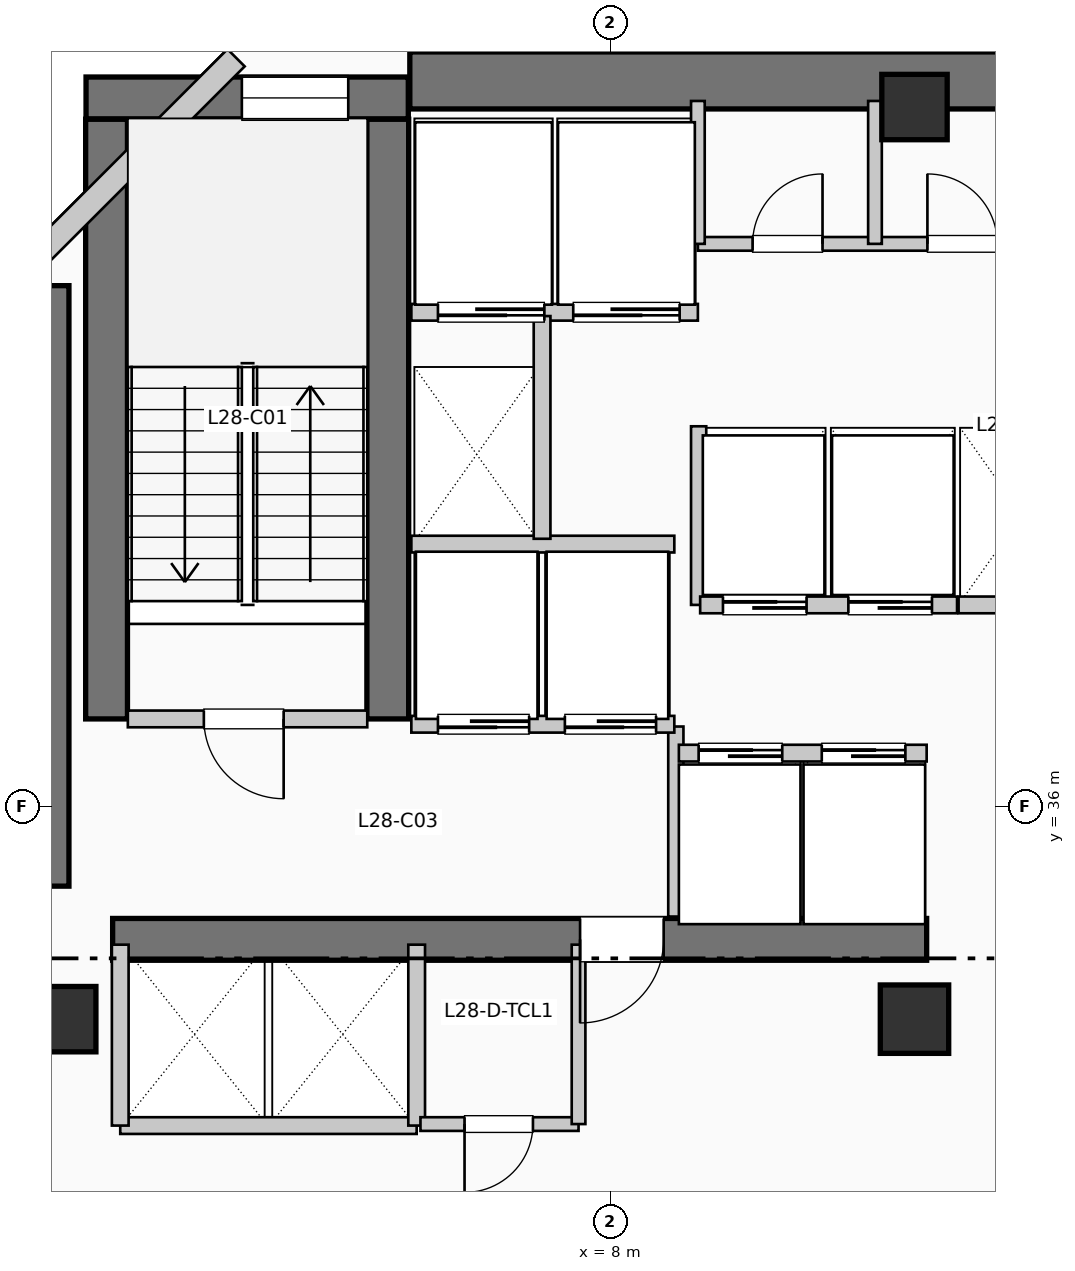
"""IFC4 building model, lengths in metres.
Left out: names, types, materials, properties, quantities, classifications, styles, units other than length and angle.
Written with IfcOpenShell. Run it as: python <this file> out.ifc"""

import sys

from ifc_helpers import new_model, si_unit, direction, frame, frame_2d, origin, origin_2d, place, context, subcontext, project, spatial, rectangle, extrude, element, fill, save


model = new_model("IFC4")
c1 = context("Model", 3, precision=1e-05, world=origin(), true_north=direction((0.0, 1.0)))
c2 = subcontext(c1, "Body", "Model", "MODEL_VIEW")
j1 = project(units=[si_unit("LENGTHUNIT", "METRE"), si_unit("PLANEANGLEUNIT", "RADIAN")], contexts=[c1])
p1 = place(None, origin())
s1 = spatial("IfcSite", under=j1, at=p1, CompositionType="ELEMENT")
p2 = place(p1, origin())
s2 = spatial("IfcBuilding", under=s1, at=p2, CompositionType="ELEMENT")
p3 = place(p2, frame((0.0, 0.0, 118.47)))
s3 = spatial("IfcBuildingStorey", under=s2, at=p3, CompositionType="ELEMENT", Elevation=118.47)
p4 = place(p3, frame((5.36, 45.55, 0.0), z_axis=(0.0, 0.0, 1.0), x_axis=(1.0, 0.0, 0.0)))
e1 = element("IfcWall", 1, at=p4, inside=s3, PredefinedType="SHEAR", context=c2, shape_type="SweptSolid", body=[
    extrude(rectangle(XDim=13.98, YDim=0.75, at=frame_2d((6.99, 0.0))), origin(), (0.0, 0.0, 1.0), 3.96),
])
p5 = place(p3, frame((0.5, 34.95, 0.0), z_axis=(0.0, 0.0, 1.0), x_axis=(0.0, 1.0, 0.0)))
e2 = element("IfcWall", 2, at=p5, inside=s3, PredefinedType="SHEAR", context=c2, shape_type="SweptSolid", body=[
    extrude(rectangle(XDim=7.9, YDim=0.75, at=frame_2d((3.95, 0.0))), origin(), (0.0, 0.0, 1.0), 3.96),
])
p6 = place(p3, frame((1.45, 34.25, 0.0), z_axis=(0.0, 0.0, 1.0), x_axis=(1.0, 0.0, 0.0)))
e3 = element("IfcWall", 3, at=p6, inside=s3, PredefinedType="SHEAR", context=c2, shape_type="SweptSolid", body=[
    extrude(rectangle(XDim=10.71, YDim=0.55, at=frame_2d((5.355, 0.0))), origin(), (0.0, 0.0, 1.0), 3.96),
])
p7 = place(p6, frame((7.25, 0.0, 0.0), z_axis=(0.0, 0.0, 1.0), x_axis=(-1.0, 0.0, 0.0)))
e4 = element("IfcOpeningElement", 4, at=p7, cuts=e3, PredefinedType="OPENING", context=c2, shape_type="SweptSolid", body=[
    extrude(rectangle(XDim=1.1, YDim=2.15, at=frame_2d((0.55, 1.075))), frame((0.0, 0.285, 0.0), z_axis=(0.0, -1.0, 0.0), x_axis=(1.0, 0.0, 0.0)), (0.0, 0.0, 1.0), 0.57),
])
for number, where, z_axis, x_axis in (
    (5, (1.37, 37.15, 0.0), (0.0, 0.0, 1.0), (0.0, 1.0, 0.0)),
    (6, (5.07, 37.15, 0.0), (0.0, 0.0, 1.0), (0.0, 1.0, 0.0)),
):
    element("IfcWall", number, at=place(p3, frame(where, z_axis=z_axis, x_axis=x_axis)), inside=s3, PredefinedType="SHEAR", context=c2, shape_type="SweptSolid", body=[
        extrude(rectangle(XDim=7.89, YDim=0.55, at=frame_2d((3.945, 0.0))), origin(), (0.0, 0.0, 1.0), 3.96),
    ])
p8 = place(p3, frame((1.1, 45.32, 0.0), z_axis=(0.0, 0.0, 1.0), x_axis=(1.0, 0.0, 0.0)))
e7 = element("IfcWall", 7, at=p8, inside=s3, PredefinedType="SHEAR", context=c2, shape_type="SweptSolid", body=[
    extrude(rectangle(XDim=4.24, YDim=0.55, at=frame_2d((2.12, 0.0))), origin(), (0.0, 0.0, 1.0), 3.96),
])
p9 = place(p8, frame((2.05, 0.0, 1.05)))
e8 = element("IfcOpeningElement", 8, at=p9, cuts=e7, PredefinedType="OPENING", context=c2, shape_type="SweptSolid", body=[
    extrude(rectangle(XDim=1.4, YDim=1.8, at=frame_2d((0.7, 0.9))), frame((0.0, 0.285, 0.0), z_axis=(0.0, -1.0, 0.0), x_axis=(1.0, 0.0, 0.0)), (0.0, 0.0, 1.0), 0.57),
])
p10 = place(p3, frame((0.8, 33.2, 0.0), z_axis=(0.0, 0.0, 1.0), x_axis=(1.0, 0.0, 0.0)))
e9 = element("IfcColumn", 9, at=p10, inside=s3, PredefinedType="COLUMN", context=c2, shape_type="SweptSolid", body=[
    extrude(rectangle(XDim=0.86, YDim=0.86, at=origin_2d()), origin(), (0.0, 0.0, 1.0), 3.96),
])
p11 = place(p3, frame((12.0, 33.2, 0.0), z_axis=(0.0, 0.0, 1.0), x_axis=(1.0, 0.0, 0.0)))
e10 = element("IfcColumn", 10, at=p11, inside=s3, PredefinedType="COLUMN", context=c2, shape_type="SweptSolid", body=[
    extrude(rectangle(XDim=0.9, YDim=0.9, at=origin_2d()), origin(), (0.0, 0.0, 1.0), 3.96),
])
p12 = place(p3, frame((12.0, 45.2, 0.0), z_axis=(0.0, 0.0, 1.0), x_axis=(1.0, 0.0, 0.0)))
e11 = element("IfcColumn", 11, at=p12, inside=s3, PredefinedType="COLUMN", context=c2, shape_type="SweptSolid", body=[
    extrude(rectangle(XDim=0.86, YDim=0.86, at=origin_2d()), origin(), (0.0, 0.0, 1.0), 3.96),
])
p13 = place(p3, frame((3.074, 45.848, 0.0), z_axis=(0.0, 0.0, 1.0), x_axis=(-0.707106781187, -0.707106781187, 0.0)))
e12 = element("IfcWall", 12, at=p13, inside=s3, PredefinedType="SOLIDWALL", context=c2, shape_type="SweptSolid", body=[
    extrude(rectangle(XDim=4.133, YDim=0.32, at=frame_2d((2.066, 0.0))), origin(), (0.0, 0.0, 1.0), 3.71),
])
p14 = place(p3, frame((1.65, 37.15, 0.0), z_axis=(0.0, 0.0, 1.0), x_axis=(1.0, 0.0, 0.0)))
e13 = element("IfcWall", 13, at=p14, inside=s3, PredefinedType="PARTITIONING", context=c2, shape_type="SweptSolid", body=[
    extrude(rectangle(XDim=3.15, YDim=0.22, at=frame_2d((1.575, 0.0))), origin(), (0.0, 0.0, 1.0), 3.71),
])
p15 = place(p14, frame((2.05, 0.0, 0.0), z_axis=(0.0, 0.0, 1.0), x_axis=(-1.0, 0.0, 0.0)))
e14 = element("IfcOpeningElement", 14, at=p15, cuts=e13, PredefinedType="OPENING", context=c2, shape_type="SweptSolid", body=[
    extrude(rectangle(XDim=1.05, YDim=2.15, at=frame_2d((0.525, 1.075))), frame((0.0, 0.12, 0.0), z_axis=(0.0, -1.0, 0.0), x_axis=(1.0, 0.0, 0.0)), (0.0, 0.0, 1.0), 0.24),
])
p16 = place(p3, frame((8.86, 34.55, 0.0), z_axis=(0.0, 0.0, 1.0), x_axis=(0.0, 1.0, 0.0)))
e15 = element("IfcWall", 15, at=p16, inside=s3, PredefinedType="PARTITIONING", context=c2, shape_type="SweptSolid", body=[
    extrude(rectangle(XDim=2.5, YDim=0.2, at=frame_2d((1.25, 0.0))), origin(), (0.0, 0.0, 1.0), 3.71),
])
p17 = place(p3, frame((5.38, 37.08, 0.0), z_axis=(0.0, 0.0, 1.0), x_axis=(1.0, 0.0, 0.0)))
e16 = element("IfcWall", 16, at=p17, inside=s3, PredefinedType="PARTITIONING", context=c2, shape_type="SweptSolid", body=[
    extrude(rectangle(XDim=3.46, YDim=0.22, at=frame_2d((1.73, 0.0))), origin(), (0.0, 0.0, 1.0), 3.71),
])
p18 = place(p17, frame((1.55, 0.0, 0.0), z_axis=(0.0, 0.0, 1.0), x_axis=(-1.0, 0.0, 0.0)))
e17 = element("IfcOpeningElement", 17, at=p18, cuts=e16, PredefinedType="OPENING", context=c2, shape_type="SweptSolid", body=[
    extrude(rectangle(XDim=1.2, YDim=2.2, at=frame_2d((0.6, 1.1))), frame((0.0, 0.12, 0.0), z_axis=(0.0, -1.0, 0.0), x_axis=(1.0, 0.0, 0.0)), (0.0, 0.0, 1.0), 0.24),
])
p19 = place(p17, frame((3.22, 0.0, 0.0), z_axis=(0.0, 0.0, 1.0), x_axis=(-1.0, 0.0, 0.0)))
e18 = element("IfcOpeningElement", 18, at=p19, cuts=e16, PredefinedType="OPENING", context=c2, shape_type="SweptSolid", body=[
    extrude(rectangle(XDim=1.2, YDim=2.2, at=frame_2d((0.6, 1.1))), frame((0.0, 0.12, 0.0), z_axis=(0.0, -1.0, 0.0), x_axis=(1.0, 0.0, 0.0)), (0.0, 0.0, 1.0), 0.24),
])
p20 = place(p3, frame((5.38, 39.45, 0.0), z_axis=(0.0, 0.0, 1.0), x_axis=(1.0, 0.0, 0.0)))
e19 = element("IfcWall", 19, at=p20, inside=s3, PredefinedType="PARTITIONING", context=c2, shape_type="SweptSolid", body=[
    extrude(rectangle(XDim=3.46, YDim=0.22, at=frame_2d((1.73, 0.0))), origin(), (0.0, 0.0, 1.0), 3.71),
])
p21 = place(p3, frame((5.38, 42.5, 0.0), z_axis=(0.0, 0.0, 1.0), x_axis=(1.0, 0.0, 0.0)))
e20 = element("IfcWall", 20, at=p21, inside=s3, PredefinedType="PARTITIONING", context=c2, shape_type="SweptSolid", body=[
    extrude(rectangle(XDim=3.77, YDim=0.22, at=frame_2d((1.885, 0.0))), origin(), (0.0, 0.0, 1.0), 3.71),
])
p22 = place(p21, frame((1.75, 0.0, 0.0), z_axis=(0.0, 0.0, 1.0), x_axis=(-1.0, 0.0, 0.0)))
e21 = element("IfcOpeningElement", 21, at=p22, cuts=e20, PredefinedType="OPENING", context=c2, shape_type="SweptSolid", body=[
    extrude(rectangle(XDim=1.4, YDim=2.2, at=frame_2d((0.7, 1.1))), frame((0.0, 0.12, 0.0), z_axis=(0.0, -1.0, 0.0), x_axis=(1.0, 0.0, 0.0)), (0.0, 0.0, 1.0), 0.24),
])
p23 = place(p21, frame((3.53, 0.0, 0.0), z_axis=(0.0, 0.0, 1.0), x_axis=(-1.0, 0.0, 0.0)))
e22 = element("IfcOpeningElement", 22, at=p23, cuts=e20, PredefinedType="OPENING", context=c2, shape_type="SweptSolid", body=[
    extrude(rectangle(XDim=1.4, YDim=2.2, at=frame_2d((0.7, 1.1))), frame((0.0, 0.12, 0.0), z_axis=(0.0, -1.0, 0.0), x_axis=(1.0, 0.0, 0.0)), (0.0, 0.0, 1.0), 0.24),
])
p24 = place(p3, frame((7.1, 39.52, 0.0), z_axis=(0.0, 0.0, 1.0), x_axis=(0.0, 1.0, 0.0)))
e23 = element("IfcWall", 23, at=p24, inside=s3, PredefinedType="PARTITIONING", context=c2, shape_type="SweptSolid", body=[
    extrude(rectangle(XDim=2.93, YDim=0.22, at=frame_2d((1.465, 0.0))), origin(), (0.0, 0.0, 1.0), 3.71),
])
p25 = place(p3, frame((1.55, 31.8, 0.0), z_axis=(0.0, 0.0, 1.0), x_axis=(1.0, 0.0, 0.0)))
e24 = element("IfcWall", 24, at=p25, inside=s3, PredefinedType="PARTITIONING", context=c2, shape_type="SweptSolid", body=[
    extrude(rectangle(XDim=3.9, YDim=0.22, at=frame_2d((1.95, 0.0))), origin(), (0.0, 0.0, 1.0), 3.71),
])
for number, where, z_axis, x_axis in (
    (25, (1.55, 31.8, 0.0), (0.0, 0.0, 1.0), (0.0, 1.0, 0.0)),
    (26, (5.45, 31.8, 0.0), (0.0, 0.0, 1.0), (0.0, 1.0, 0.0)),
):
    element("IfcWall", number, at=place(p3, frame(where, z_axis=z_axis, x_axis=x_axis)), inside=s3, PredefinedType="PARTITIONING", context=c2, shape_type="SweptSolid", body=[
        extrude(rectangle(XDim=2.38, YDim=0.22, at=frame_2d((1.19, 0.0))), origin(), (0.0, 0.0, 1.0), 3.71),
    ])
p26 = place(p3, frame((9.16, 38.65, 0.0), z_axis=(0.0, 0.0, 1.0), x_axis=(0.0, 1.0, 0.0)))
e27 = element("IfcWall", 27, at=p26, inside=s3, PredefinedType="PARTITIONING", context=c2, shape_type="SweptSolid", body=[
    extrude(rectangle(XDim=2.35, YDim=0.2, at=frame_2d((1.175, 0.0))), origin(), (0.0, 0.0, 1.0), 3.71),
])
p27 = place(p3, frame((5.5, 31.82, 0.0), z_axis=(0.0, 0.0, 1.0), x_axis=(1.0, 0.0, 0.0)))
e28 = element("IfcWall", 28, at=p27, inside=s3, PredefinedType="PLUMBINGWALL", context=c2, shape_type="SweptSolid", body=[
    extrude(rectangle(XDim=2.08, YDim=0.18, at=frame_2d((1.04, 0.0))), origin(), (0.0, 0.0, 1.0), 3.71),
])
p28 = place(p27, frame((1.48, 0.0, 0.0), z_axis=(0.0, 0.0, 1.0), x_axis=(-1.0, 0.0, 0.0)))
e29 = element("IfcOpeningElement", 29, at=p28, cuts=e28, PredefinedType="OPENING", context=c2, shape_type="SweptSolid", body=[
    extrude(rectangle(XDim=0.9, YDim=2.1, at=frame_2d((0.45, 1.05))), frame((0.0, 0.1, 0.0), z_axis=(0.0, -1.0, 0.0), x_axis=(1.0, 0.0, 0.0)), (0.0, 0.0, 1.0), 0.2),
])
p29 = place(p3, frame((7.58, 31.82, 0.0), z_axis=(0.0, 0.0, 1.0), x_axis=(0.0, 1.0, 0.0)))
e30 = element("IfcWall", 30, at=p29, inside=s3, PredefinedType="PLUMBINGWALL", context=c2, shape_type="SweptSolid", body=[
    extrude(rectangle(XDim=2.36, YDim=0.18, at=frame_2d((1.18, 0.0))), origin(), (0.0, 0.0, 1.0), 3.71),
])
p30 = place(p3, frame((8.9, 36.7, 0.0), z_axis=(0.0, 0.0, 1.0), x_axis=(1.0, 0.0, 0.0)))
e31 = element("IfcWall", 31, at=p30, inside=s3, PredefinedType="PARTITIONING", context=c2, shape_type="SweptSolid", body=[
    extrude(rectangle(XDim=3.26, YDim=0.22, at=frame_2d((1.63, 0.0))), origin(), (0.0, 0.0, 1.0), 3.71),
])
p31 = place(p30, frame((0.26, 0.0, 0.0)))
e32 = element("IfcOpeningElement", 32, at=p31, cuts=e31, PredefinedType="OPENING", context=c2, shape_type="SweptSolid", body=[
    extrude(rectangle(XDim=1.1, YDim=2.2, at=frame_2d((0.55, 1.1))), frame((0.0, 0.12, 0.0), z_axis=(0.0, -1.0, 0.0), x_axis=(1.0, 0.0, 0.0)), (0.0, 0.0, 1.0), 0.24),
])
p32 = place(p30, frame((1.88, 0.0, 0.0)))
e33 = element("IfcOpeningElement", 33, at=p32, cuts=e31, PredefinedType="OPENING", context=c2, shape_type="SweptSolid", body=[
    extrude(rectangle(XDim=1.1, YDim=2.2, at=frame_2d((0.55, 1.1))), frame((0.0, 0.12, 0.0), z_axis=(0.0, -1.0, 0.0), x_axis=(1.0, 0.0, 0.0)), (0.0, 0.0, 1.0), 0.24),
])
p33 = place(p3, frame((9.18, 38.65, 0.0), z_axis=(0.0, 0.0, 1.0), x_axis=(1.0, 0.0, 0.0)))
e34 = element("IfcWall", 34, at=p33, inside=s3, PredefinedType="PARTITIONING", context=c2, shape_type="SweptSolid", body=[
    extrude(rectangle(XDim=3.38, YDim=0.22, at=frame_2d((1.69, 0.0))), origin(), (0.0, 0.0, 1.0), 3.71),
])
p34 = place(p33, frame((0.3, 0.0, 0.0)))
e35 = element("IfcOpeningElement", 35, at=p34, cuts=e34, PredefinedType="OPENING", context=c2, shape_type="SweptSolid", body=[
    extrude(rectangle(XDim=1.1, YDim=2.2, at=frame_2d((0.55, 1.1))), frame((0.0, 0.12, 0.0), z_axis=(0.0, -1.0, 0.0), x_axis=(1.0, 0.0, 0.0)), (0.0, 0.0, 1.0), 0.24),
])
p35 = place(p33, frame((1.95, 0.0, 0.0)))
e36 = element("IfcOpeningElement", 36, at=p35, cuts=e34, PredefinedType="OPENING", context=c2, shape_type="SweptSolid", body=[
    extrude(rectangle(XDim=1.1, YDim=2.2, at=frame_2d((0.55, 1.1))), frame((0.0, 0.12, 0.0), z_axis=(0.0, -1.0, 0.0), x_axis=(1.0, 0.0, 0.0)), (0.0, 0.0, 1.0), 0.24),
])
p36 = place(p3, frame((12.58, 38.65, 0.0), z_axis=(0.0, 0.0, 1.0), x_axis=(1.0, 0.0, 0.0)))
e37 = element("IfcWall", 37, at=p36, inside=s3, PredefinedType="PARTITIONING", context=c2, shape_type="SweptSolid", body=[
    extrude(rectangle(XDim=3.38, YDim=0.22, at=frame_2d((1.69, 0.0))), origin(), (0.0, 0.0, 1.0), 3.71),
])
p37 = place(p3, frame((9.15, 43.4, 0.0), z_axis=(0.0, 0.0, 1.0), x_axis=(1.0, 0.0, 0.0)))
e38 = element("IfcWall", 38, at=p37, inside=s3, PredefinedType="PLUMBINGWALL", context=c2, shape_type="SweptSolid", body=[
    extrude(rectangle(XDim=9.33, YDim=0.18, at=frame_2d((4.665, 0.0))), origin(), (0.0, 0.0, 1.0), 3.71),
])
p38 = place(p37, frame((0.72, 0.0, 0.0)))
e39 = element("IfcOpeningElement", 39, at=p38, cuts=e38, PredefinedType="OPENING", context=c2, shape_type="SweptSolid", body=[
    extrude(rectangle(XDim=0.92, YDim=2.1, at=frame_2d((0.46, 1.05))), frame((0.0, 0.1, 0.0), z_axis=(0.0, -1.0, 0.0), x_axis=(1.0, 0.0, 0.0)), (0.0, 0.0, 1.0), 0.2),
])
p39 = place(p37, frame((3.02, 0.0, 0.0)))
e40 = element("IfcOpeningElement", 40, at=p39, cuts=e38, PredefinedType="OPENING", context=c2, shape_type="SweptSolid", body=[
    extrude(rectangle(XDim=0.92, YDim=2.1, at=frame_2d((0.46, 1.05))), frame((0.0, 0.1, 0.0), z_axis=(0.0, -1.0, 0.0), x_axis=(1.0, 0.0, 0.0)), (0.0, 0.0, 1.0), 0.2),
])
p40 = place(p37, frame((5.34, 0.0, 0.0)))
e41 = element("IfcOpeningElement", 41, at=p40, cuts=e38, PredefinedType="OPENING", context=c2, shape_type="SweptSolid", body=[
    extrude(rectangle(XDim=0.92, YDim=2.1, at=frame_2d((0.46, 1.05))), frame((0.0, 0.1, 0.0), z_axis=(0.0, -1.0, 0.0), x_axis=(1.0, 0.0, 0.0)), (0.0, 0.0, 1.0), 0.2),
])
p41 = place(p37, frame((7.66, 0.0, 0.0)))
e42 = element("IfcOpeningElement", 42, at=p41, cuts=e38, PredefinedType="OPENING", context=c2, shape_type="SweptSolid", body=[
    extrude(rectangle(XDim=0.95, YDim=2.1, at=frame_2d((0.475, 1.05))), frame((0.0, 0.1, 0.0), z_axis=(0.0, -1.0, 0.0), x_axis=(1.0, 0.0, 0.0)), (0.0, 0.0, 1.0), 0.2),
])
for number, where, z_axis, x_axis in (
    (43, (9.15, 43.4, 0.0), (0.0, 0.0, 1.0), (0.0, 1.0, 0.0)),
    (44, (11.48, 43.4, 0.0), (0.0, 0.0, 1.0), (0.0, 1.0, 0.0)),
):
    element("IfcWall", number, at=place(p3, frame(where, z_axis=z_axis, x_axis=x_axis)), inside=s3, PredefinedType="PLUMBINGWALL", context=c2, shape_type="SweptSolid", body=[
        extrude(rectangle(XDim=1.88, YDim=0.18, at=frame_2d((0.94, 0.0))), origin(), (0.0, 0.0, 1.0), 3.71),
    ])
p42 = place(p9, origin())
e45 = element("IfcWindow", 45, at=p42, inside=s3, PartitioningType="SINGLE_PANEL", PredefinedType="WINDOW", context=c2, shape_type="SweptSolid", body=[
    extrude(rectangle(XDim=1.4, YDim=1.8, at=frame_2d((0.7, 0.9))), frame((0.0, 0.03, 0.0), z_axis=(0.0, -1.0, 0.0), x_axis=(1.0, 0.0, 0.0)), (0.0, 0.0, 1.0), 0.06),
])
fill(e8, e45)
p43 = place(p15, origin())
e46 = element("IfcDoor", 46, at=p43, inside=s3, OperationType="SINGLE_SWING_RIGHT", PredefinedType="DOOR", context=c2, shape_type="SweptSolid", body=[
    extrude(rectangle(XDim=1.05, YDim=2.15, at=frame_2d((0.525, 1.075))), frame((0.0, 0.025, 0.0), z_axis=(0.0, -1.0, 0.0), x_axis=(1.0, 0.0, 0.0)), (0.0, 0.0, 1.0), 0.05),
])
fill(e14, e46)
p44 = place(p7, origin())
e47 = element("IfcDoor", 47, at=p44, inside=s3, OperationType="SINGLE_SWING_LEFT", PredefinedType="DOOR", context=c2, shape_type="SweptSolid", body=[
    extrude(rectangle(XDim=1.1, YDim=2.15, at=frame_2d((0.55, 1.075))), frame((0.0, 0.025, 0.0), z_axis=(0.0, -1.0, 0.0), x_axis=(1.0, 0.0, 0.0)), (0.0, 0.0, 1.0), 0.05),
])
fill(e4, e47)
p45 = place(p18, origin())
e48 = element("IfcDoor", 48, at=p45, inside=s3, OperationType="SLIDING_TO_RIGHT", PredefinedType="DOOR", context=c2, shape_type="SweptSolid", body=[
    extrude(rectangle(XDim=1.2, YDim=2.2, at=frame_2d((0.6, 1.1))), frame((0.0, 0.025, 0.0), z_axis=(0.0, -1.0, 0.0), x_axis=(1.0, 0.0, 0.0)), (0.0, 0.0, 1.0), 0.05),
])
fill(e17, e48)
p46 = place(p19, origin())
e49 = element("IfcDoor", 49, at=p46, inside=s3, OperationType="SLIDING_TO_RIGHT", PredefinedType="DOOR", context=c2, shape_type="SweptSolid", body=[
    extrude(rectangle(XDim=1.2, YDim=2.2, at=frame_2d((0.6, 1.1))), frame((0.0, 0.025, 0.0), z_axis=(0.0, -1.0, 0.0), x_axis=(1.0, 0.0, 0.0)), (0.0, 0.0, 1.0), 0.05),
])
fill(e18, e49)
p47 = place(p22, origin())
e50 = element("IfcDoor", 50, at=p47, inside=s3, OperationType="SLIDING_TO_LEFT", PredefinedType="DOOR", context=c2, shape_type="SweptSolid", body=[
    extrude(rectangle(XDim=1.4, YDim=2.2, at=frame_2d((0.7, 1.1))), frame((0.0, 0.025, 0.0), z_axis=(0.0, -1.0, 0.0), x_axis=(1.0, 0.0, 0.0)), (0.0, 0.0, 1.0), 0.05),
])
fill(e21, e50)
p48 = place(p23, origin())
e51 = element("IfcDoor", 51, at=p48, inside=s3, OperationType="SLIDING_TO_LEFT", PredefinedType="DOOR", context=c2, shape_type="SweptSolid", body=[
    extrude(rectangle(XDim=1.4, YDim=2.2, at=frame_2d((0.7, 1.1))), frame((0.0, 0.025, 0.0), z_axis=(0.0, -1.0, 0.0), x_axis=(1.0, 0.0, 0.0)), (0.0, 0.0, 1.0), 0.05),
])
fill(e22, e51)
p49 = place(p28, origin())
e52 = element("IfcDoor", 52, at=p49, inside=s3, OperationType="SINGLE_SWING_LEFT", PredefinedType="DOOR", context=c2, shape_type="SweptSolid", body=[
    extrude(rectangle(XDim=0.9, YDim=2.1, at=frame_2d((0.45, 1.05))), frame((0.0, 0.025, 0.0), z_axis=(0.0, -1.0, 0.0), x_axis=(1.0, 0.0, 0.0)), (0.0, 0.0, 1.0), 0.05),
])
fill(e29, e52)
p50 = place(p31, origin())
e53 = element("IfcDoor", 53, at=p50, inside=s3, OperationType="SLIDING_TO_LEFT", PredefinedType="DOOR", context=c2, shape_type="SweptSolid", body=[
    extrude(rectangle(XDim=1.1, YDim=2.2, at=frame_2d((0.55, 1.1))), frame((0.0, 0.025, 0.0), z_axis=(0.0, -1.0, 0.0), x_axis=(1.0, 0.0, 0.0)), (0.0, 0.0, 1.0), 0.05),
])
fill(e32, e53)
p51 = place(p32, origin())
e54 = element("IfcDoor", 54, at=p51, inside=s3, OperationType="SLIDING_TO_LEFT", PredefinedType="DOOR", context=c2, shape_type="SweptSolid", body=[
    extrude(rectangle(XDim=1.1, YDim=2.2, at=frame_2d((0.55, 1.1))), frame((0.0, 0.025, 0.0), z_axis=(0.0, -1.0, 0.0), x_axis=(1.0, 0.0, 0.0)), (0.0, 0.0, 1.0), 0.05),
])
fill(e33, e54)
p52 = place(p34, origin())
e55 = element("IfcDoor", 55, at=p52, inside=s3, OperationType="SLIDING_TO_LEFT", PredefinedType="DOOR", context=c2, shape_type="SweptSolid", body=[
    extrude(rectangle(XDim=1.1, YDim=2.2, at=frame_2d((0.55, 1.1))), frame((0.0, 0.025, 0.0), z_axis=(0.0, -1.0, 0.0), x_axis=(1.0, 0.0, 0.0)), (0.0, 0.0, 1.0), 0.05),
])
fill(e35, e55)
p53 = place(p35, origin())
e56 = element("IfcDoor", 56, at=p53, inside=s3, OperationType="SLIDING_TO_LEFT", PredefinedType="DOOR", context=c2, shape_type="SweptSolid", body=[
    extrude(rectangle(XDim=1.1, YDim=2.2, at=frame_2d((0.55, 1.1))), frame((0.0, 0.025, 0.0), z_axis=(0.0, -1.0, 0.0), x_axis=(1.0, 0.0, 0.0)), (0.0, 0.0, 1.0), 0.05),
])
fill(e36, e56)
p54 = place(p38, origin())
e57 = element("IfcDoor", 57, at=p54, inside=s3, OperationType="SINGLE_SWING_RIGHT", PredefinedType="DOOR", context=c2, shape_type="SweptSolid", body=[
    extrude(rectangle(XDim=0.92, YDim=2.1, at=frame_2d((0.46, 1.05))), frame((0.0, 0.025, 0.0), z_axis=(0.0, -1.0, 0.0), x_axis=(1.0, 0.0, 0.0)), (0.0, 0.0, 1.0), 0.05),
])
fill(e39, e57)
p55 = place(p39, origin())
e58 = element("IfcDoor", 58, at=p55, inside=s3, OperationType="SINGLE_SWING_LEFT", PredefinedType="DOOR", context=c2, shape_type="SweptSolid", body=[
    extrude(rectangle(XDim=0.92, YDim=2.1, at=frame_2d((0.46, 1.05))), frame((0.0, 0.025, 0.0), z_axis=(0.0, -1.0, 0.0), x_axis=(1.0, 0.0, 0.0)), (0.0, 0.0, 1.0), 0.05),
])
fill(e40, e58)
save(model, sys.argv[1])
